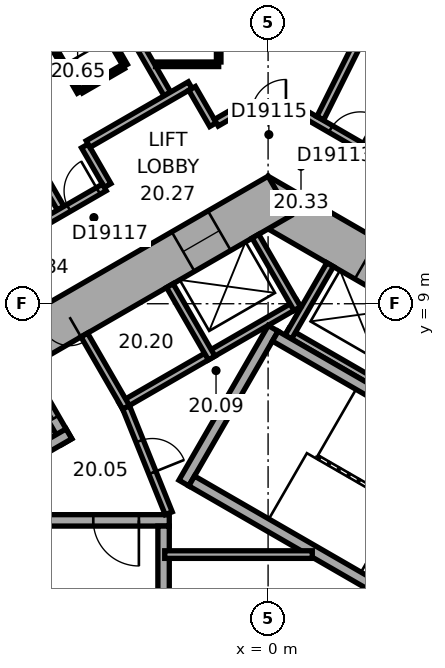
"""IFC4 building model, lengths in metres.
Left out: names, types, materials, properties, quantities, classifications, styles, units other than length and angle.
Written with IfcOpenShell. Run it as: python <this file> out.ifc"""

import sys

from ifc_helpers import new_model, si_unit, direction, frame, frame_2d, origin, place, context, subcontext, project, spatial, rectangle, extrude, element, fill, save


model = new_model("IFC4")
c1 = context("Model", 3, precision=1e-05, world=origin(), true_north=direction((0.0, 1.0)))
c2 = subcontext(c1, "Body", "Model", "MODEL_VIEW")
j1 = project(units=[si_unit("LENGTHUNIT", "METRE"), si_unit("PLANEANGLEUNIT", "RADIAN")], contexts=[c1])
p1 = place(None, origin())
s1 = spatial("IfcSite", under=j1, at=p1, CompositionType="ELEMENT")
p2 = place(p1, origin())
s2 = spatial("IfcBuilding", under=s1, at=p2, CompositionType="ELEMENT")
p3 = place(p2, frame((0.0, 0.0, 90.2)))
s3 = spatial("IfcBuildingStorey", under=s2, at=p3, CompositionType="ELEMENT", Elevation=90.2)
p4 = place(p3, frame((10.4, 5.658, 0.0), z_axis=(0.0, 0.0, 1.0), x_axis=(-0.866021384402, 0.500006961711, 0.0)))
e1 = element("IfcWall", 1, at=p4, inside=s3, PredefinedType="SHEAR", context=c2, shape_type="SweptSolid", body=[
    extrude(rectangle(XDim=12.355, YDim=1.2, at=frame_2d((6.178, 0.0))), origin(), (0.0, 0.0, 1.0), 3.3),
])
p5 = place(p4, frame((2.728, 0.0, 0.0)))
e2 = element("IfcOpeningElement", 2, at=p5, cuts=e1, PredefinedType="OPENING", context=c2, shape_type="SweptSolid", body=[
    extrude(rectangle(XDim=1.1, YDim=2.1, at=frame_2d((0.55, 1.05))), frame((0.0, 0.61, 0.0), z_axis=(0.0, -1.0, 0.0), x_axis=(1.0, 0.0, 0.0)), (0.0, 0.0, 1.0), 1.22),
])
p6 = place(p4, frame((5.328, 0.0, 0.0)))
e3 = element("IfcOpeningElement", 3, at=p6, cuts=e1, PredefinedType="OPENING", context=c2, shape_type="SweptSolid", body=[
    extrude(rectangle(XDim=1.1, YDim=2.1, at=frame_2d((0.55, 1.05))), frame((0.0, 0.61, 0.0), z_axis=(0.0, -1.0, 0.0), x_axis=(1.0, 0.0, 0.0)), (0.0, 0.0, 1.0), 1.22),
])
p7 = place(p4, frame((7.928, 0.0, 0.0)))
e4 = element("IfcOpeningElement", 4, at=p7, cuts=e1, PredefinedType="OPENING", context=c2, shape_type="SweptSolid", body=[
    extrude(rectangle(XDim=1.1, YDim=2.1, at=frame_2d((0.55, 1.05))), frame((0.0, 0.61, 0.0), z_axis=(0.0, -1.0, 0.0), x_axis=(1.0, 0.0, 0.0)), (0.0, 0.0, 1.0), 1.22),
])
p8 = place(p3, frame((0.3, 11.836, 0.0), z_axis=(0.0, 0.0, 1.0), x_axis=(-0.866021384402, -0.500006961711, 0.0)))
e5 = element("IfcWall", 5, at=p8, inside=s3, PredefinedType="SHEAR", context=c2, shape_type="SweptSolid", body=[
    extrude(rectangle(XDim=12.355, YDim=1.2, at=frame_2d((6.178, 0.0))), origin(), (0.0, 0.0, 1.0), 3.3),
])
p9 = place(p8, frame((6.378, 0.0, 0.0)))
e6 = element("IfcOpeningElement", 6, at=p9, cuts=e5, PredefinedType="OPENING", context=c2, shape_type="SweptSolid", body=[
    extrude(rectangle(XDim=1.5, YDim=2.1, at=frame_2d((0.75, 1.05))), frame((0.0, 0.61, 0.0), z_axis=(0.0, -1.0, 0.0), x_axis=(1.0, 0.0, 0.0)), (0.0, 0.0, 1.0), 1.22),
])
p10 = place(p8, frame((1.828, 0.0, 0.0)))
e7 = element("IfcOpeningElement", 7, at=p10, cuts=e5, PredefinedType="OPENING", context=c2, shape_type="SweptSolid", body=[
    extrude(rectangle(XDim=1.1, YDim=2.1, at=frame_2d((0.55, 1.05))), frame((0.0, 0.61, 0.0), z_axis=(0.0, -1.0, 0.0), x_axis=(1.0, 0.0, 0.0)), (0.0, 0.0, 1.0), 1.22),
])
p11 = place(p3, frame((20.63, 15.47, 0.0), z_axis=(0.0, 0.0, 1.0), x_axis=(-0.894934518609, 0.446197498203, 0.0)))
e8 = element("IfcWall", 8, at=p11, inside=s3, PredefinedType="STANDARD", context=c2, shape_type="SweptSolid", body=[
    extrude(rectangle(XDim=21.246, YDim=0.2, at=frame_2d((10.623, 0.0))), origin(), (0.0, 0.0, 1.0), 3.3),
])
p12 = place(p11, frame((1.553, 0.0, 0.8)))
e9 = element("IfcOpeningElement", 9, at=p12, cuts=e8, PredefinedType="OPENING", context=c2, shape_type="SweptSolid", body=[
    extrude(rectangle(XDim=2.4, YDim=1.7, at=frame_2d((1.2, 0.85))), frame((0.0, 0.11, 0.0), z_axis=(0.0, -1.0, 0.0), x_axis=(1.0, 0.0, 0.0)), (0.0, 0.0, 1.0), 0.22),
])
p13 = place(p11, frame((5.488, 0.0, 0.8)))
e10 = element("IfcOpeningElement", 10, at=p13, cuts=e8, PredefinedType="OPENING", context=c2, shape_type="SweptSolid", body=[
    extrude(rectangle(XDim=2.4, YDim=1.7, at=frame_2d((1.2, 0.85))), frame((0.0, 0.11, 0.0), z_axis=(0.0, -1.0, 0.0), x_axis=(1.0, 0.0, 0.0)), (0.0, 0.0, 1.0), 0.22),
])
p14 = place(p11, frame((9.422, 0.0, 0.8)))
e11 = element("IfcOpeningElement", 11, at=p14, cuts=e8, PredefinedType="OPENING", context=c2, shape_type="SweptSolid", body=[
    extrude(rectangle(XDim=2.4, YDim=1.7, at=frame_2d((1.2, 0.85))), frame((0.0, 0.11, 0.0), z_axis=(0.0, -1.0, 0.0), x_axis=(1.0, 0.0, 0.0)), (0.0, 0.0, 1.0), 0.22),
])
p15 = place(p11, frame((13.357, 0.0, 0.8)))
e12 = element("IfcOpeningElement", 12, at=p15, cuts=e8, PredefinedType="OPENING", context=c2, shape_type="SweptSolid", body=[
    extrude(rectangle(XDim=2.4, YDim=1.7, at=frame_2d((1.2, 0.85))), frame((0.0, 0.11, 0.0), z_axis=(0.0, -1.0, 0.0), x_axis=(1.0, 0.0, 0.0)), (0.0, 0.0, 1.0), 0.22),
])
p16 = place(p11, frame((17.292, 0.0, 0.8)))
e13 = element("IfcOpeningElement", 13, at=p16, cuts=e8, PredefinedType="OPENING", context=c2, shape_type="SweptSolid", body=[
    extrude(rectangle(XDim=2.4, YDim=1.7, at=frame_2d((1.2, 0.85))), frame((0.0, 0.11, 0.0), z_axis=(0.0, -1.0, 0.0), x_axis=(1.0, 0.0, 0.0)), (0.0, 0.0, 1.0), 0.22),
])
p17 = place(p3, frame((-3.136, 24.805, 0.0), z_axis=(0.0, 0.0, 1.0), x_axis=(-0.866028291626, -0.499994998079, 0.0)))
e14 = element("IfcWall", 14, at=p17, inside=s3, PredefinedType="STANDARD", context=c2, shape_type="SweptSolid", body=[
    extrude(rectangle(XDim=21.246, YDim=0.2, at=frame_2d((10.623, 0.0))), origin(), (0.0, 0.0, 1.0), 3.3),
])
p18 = place(p17, frame((1.555, 0.0, 0.8)))
e15 = element("IfcOpeningElement", 15, at=p18, cuts=e14, PredefinedType="OPENING", context=c2, shape_type="SweptSolid", body=[
    extrude(rectangle(XDim=2.4, YDim=1.7, at=frame_2d((1.2, 0.85))), frame((0.0, 0.11, 0.0), z_axis=(0.0, -1.0, 0.0), x_axis=(1.0, 0.0, 0.0)), (0.0, 0.0, 1.0), 0.22),
])
p19 = place(p17, frame((5.489, 0.0, 0.8)))
e16 = element("IfcOpeningElement", 16, at=p19, cuts=e14, PredefinedType="OPENING", context=c2, shape_type="SweptSolid", body=[
    extrude(rectangle(XDim=2.4, YDim=1.7, at=frame_2d((1.2, 0.85))), frame((0.0, 0.11, 0.0), z_axis=(0.0, -1.0, 0.0), x_axis=(1.0, 0.0, 0.0)), (0.0, 0.0, 1.0), 0.22),
])
p20 = place(p17, frame((9.424, 0.0, 0.8)))
e17 = element("IfcOpeningElement", 17, at=p20, cuts=e14, PredefinedType="OPENING", context=c2, shape_type="SweptSolid", body=[
    extrude(rectangle(XDim=2.4, YDim=1.7, at=frame_2d((1.2, 0.85))), frame((0.0, 0.11, 0.0), z_axis=(0.0, -1.0, 0.0), x_axis=(1.0, 0.0, 0.0)), (0.0, 0.0, 1.0), 0.22),
])
p21 = place(p17, frame((13.358, 0.0, 0.8)))
e18 = element("IfcOpeningElement", 18, at=p21, cuts=e14, PredefinedType="OPENING", context=c2, shape_type="SweptSolid", body=[
    extrude(rectangle(XDim=2.4, YDim=1.7, at=frame_2d((1.2, 0.85))), frame((0.0, 0.11, 0.0), z_axis=(0.0, -1.0, 0.0), x_axis=(1.0, 0.0, 0.0)), (0.0, 0.0, 1.0), 0.22),
])
p22 = place(p17, frame((17.293, 0.0, 0.8)))
e19 = element("IfcOpeningElement", 19, at=p22, cuts=e14, PredefinedType="OPENING", context=c2, shape_type="SweptSolid", body=[
    extrude(rectangle(XDim=2.4, YDim=1.7, at=frame_2d((1.2, 0.85))), frame((0.0, 0.11, 0.0), z_axis=(0.0, -1.0, 0.0), x_axis=(1.0, 0.0, 0.0)), (0.0, 0.0, 1.0), 0.22),
])
p23 = place(p3, frame((7.424, 4.259, 0.0), z_axis=(0.0, 0.0, 1.0), x_axis=(-0.866026010844, 0.49999894854, 0.0)))
e20 = element("IfcWall", 20, at=p23, inside=s3, PredefinedType="PARTITIONING", context=c2, shape_type="SweptSolid", body=[
    extrude(rectangle(XDim=8.0, YDim=0.2, at=frame_2d((4.0, 0.0))), origin(), (0.0, 0.0, 1.0), 3.05),
])
p24 = place(p3, frame((0.532, 8.122, 0.0), z_axis=(0.0, 0.0, 1.0), x_axis=(0.500077893725, 0.86598042715, 0.0)))
e21 = element("IfcWall", 21, at=p24, inside=s3, PredefinedType="PARTITIONING", context=c2, shape_type="SweptSolid", body=[
    extrude(rectangle(XDim=2.2, YDim=0.2, at=frame_2d((1.1, 0.0))), origin(), (0.0, 0.0, 1.0), 3.05),
])
p25 = place(p3, frame((0.803, 9.009, 0.0), z_axis=(0.0, 0.0, 1.0), x_axis=(-0.866028230842, -0.499995103361, 0.0)))
e22 = element("IfcWall", 22, at=p25, inside=s3, PredefinedType="PARTITIONING", context=c2, shape_type="SweptSolid", body=[
    extrude(rectangle(XDim=5.4, YDim=0.2, at=frame_2d((2.7, 0.0))), origin(), (0.0, 0.0, 1.0), 3.05),
])
p26 = place(p3, frame((0.767, 8.872, 0.0), z_axis=(0.0, 0.0, 1.0), x_axis=(-0.499994660107, 0.866028486751, 0.0)))
e23 = element("IfcWall", 23, at=p26, inside=s3, PredefinedType="PARTITIONING", context=c2, shape_type="SweptSolid", body=[
    extrude(rectangle(XDim=2.2, YDim=0.2, at=frame_2d((1.1, 0.0))), origin(), (0.0, 0.0, 1.0), 3.05),
])
for number, where, z_axis, x_axis in (
    (24, (-1.485, 7.572, 0.0), (0.0, 0.0, 1.0), (-0.5, 0.866, 0.0)),
    (25, (-3.737, 6.272, 0.0), (0.0, 0.0, 1.0), (-0.5, 0.866, 0.0)),
):
    element("IfcWall", number, at=place(p3, frame(where, z_axis=z_axis, x_axis=x_axis)), inside=s3, PredefinedType="PARTITIONING", context=c2, shape_type="SweptSolid", body=[
        extrude(rectangle(XDim=2.2, YDim=0.2, at=frame_2d((1.1, 0.0))), origin(), (0.0, 0.0, 1.0), 3.05),
    ])
p27 = place(p3, frame((-2.216, 4.282, 0.0), z_axis=(0.0, 0.0, 1.0), x_axis=(0.499977259774, 0.866038532462, 0.0)))
e26 = element("IfcWall", 26, at=p27, inside=s3, PredefinedType="SHEAR", context=c2, shape_type="SweptSolid", body=[
    extrude(rectangle(XDim=4.7, YDim=0.3, at=frame_2d((2.35, 0.0))), origin(), (0.0, 0.0, 1.0), 3.05),
])
for number, where, z_axis, x_axis in (
    (27, (4.103, 0.807, 0.0), (0.0, 0.0, 1.0), (-0.866, 0.5, 0.0)),
    (28, (6.303, 4.617, 0.0), (0.0, 0.0, 1.0), (-0.866, 0.5, 0.0)),
):
    element("IfcWall", number, at=place(p3, frame(where, z_axis=z_axis, x_axis=x_axis)), inside=s3, PredefinedType="SHEAR", context=c2, shape_type="SweptSolid", body=[
        extrude(rectangle(XDim=7.06, YDim=0.3, at=frame_2d((3.53, 0.0))), origin(), (0.0, 0.0, 1.0), 3.05),
    ])
p28 = place(p3, frame((-2.6, 3.3, 0.0), z_axis=(0.0, 0.0, 1.0), x_axis=(-1.0, 0.0, 0.0)))
e29 = element("IfcWall", 29, at=p28, inside=s3, PredefinedType="SHEAR", context=c2, shape_type="SweptSolid", body=[
    extrude(rectangle(XDim=4.7, YDim=0.3, at=frame_2d((2.35, 0.0))), origin(), (0.0, 0.0, 1.0), 3.05),
])
p29 = place(p28, frame((0.8, 0.0, 0.0)))
e30 = element("IfcOpeningElement", 30, at=p29, cuts=e29, PredefinedType="OPENING", context=c2, shape_type="SweptSolid", body=[
    extrude(rectangle(XDim=1.2, YDim=2.1, at=frame_2d((0.6, 1.05))), frame((0.0, 0.16, 0.0), z_axis=(0.0, -1.0, 0.0), x_axis=(1.0, 0.0, 0.0)), (0.0, 0.0, 1.0), 0.32),
])
p30 = place(p3, frame((-2.75, 3.15, 0.0), z_axis=(0.0, 0.0, 1.0), x_axis=(0.0, -1.0, 0.0)))
e31 = element("IfcWall", 31, at=p30, inside=s3, PredefinedType="SHEAR", context=c2, shape_type="SweptSolid", body=[
    extrude(rectangle(XDim=7.06, YDim=0.3, at=frame_2d((3.53, 0.0))), origin(), (0.0, 0.0, 1.0), 3.05),
])
p31 = place(p3, frame((-5.295, 5.372, 0.0), z_axis=(0.0, 0.0, 1.0), x_axis=(-0.500077893725, 0.86598042715, 0.0)))
e32 = element("IfcWall", 32, at=p31, inside=s3, PredefinedType="SHEAR", context=c2, shape_type="SweptSolid", body=[
    extrude(rectangle(XDim=2.2, YDim=0.3, at=frame_2d((1.1, 0.0))), origin(), (0.0, 0.0, 1.0), 3.05),
])
p32 = place(p31, frame((0.7, 0.0, 0.0)))
e33 = element("IfcOpeningElement", 33, at=p32, cuts=e32, PredefinedType="OPENING", context=c2, shape_type="SweptSolid", body=[
    extrude(rectangle(XDim=1.1, YDim=2.1, at=frame_2d((0.55, 1.05))), frame((0.0, 0.16, 0.0), z_axis=(0.0, -1.0, 0.0), x_axis=(1.0, 0.0, 0.0)), (0.0, 0.0, 1.0), 0.32),
])
p33 = place(p3, frame((-5.24, 5.577, 0.0), z_axis=(0.0, 0.0, 1.0), x_axis=(-0.866014461049, -0.500018952895, 0.0)))
e34 = element("IfcWall", 34, at=p33, inside=s3, PredefinedType="SHEAR", context=c2, shape_type="SweptSolid", body=[
    extrude(rectangle(XDim=3.35, YDim=0.3, at=frame_2d((1.675, 0.0))), origin(), (0.0, 0.0, 1.0), 3.05),
])
p34 = place(p3, frame((-2.615, 3.487, 0.0), z_axis=(0.0, 0.0, 1.0), x_axis=(-0.373576831041, 0.92759924068, 0.0)))
e35 = element("IfcWall", 35, at=p34, inside=s3, PredefinedType="PARTITIONING", context=c2, shape_type="SweptSolid", body=[
    extrude(rectangle(XDim=3.002, YDim=0.2, at=frame_2d((1.501, 0.0))), origin(), (0.0, 0.0, 1.0), 3.05),
])
p35 = place(p34, frame((1.15, 0.0, 0.0)))
e36 = element("IfcOpeningElement", 36, at=p35, cuts=e35, PredefinedType="OPENING", context=c2, shape_type="SweptSolid", body=[
    extrude(rectangle(XDim=0.9, YDim=2.1, at=frame_2d((0.45, 1.05))), frame((0.0, 0.11, 0.0), z_axis=(0.0, -1.0, 0.0), x_axis=(1.0, 0.0, 0.0)), (0.0, 0.0, 1.0), 0.22),
])
p36 = place(p3, frame((-2.72, 2.4, 0.0), z_axis=(0.0, 0.0, 1.0), x_axis=(1.0, 0.0, 0.0)))
e37 = element("IfcWall", 37, at=p36, inside=s3, PredefinedType="PARTITIONING", context=c2, shape_type="SweptSolid", body=[
    extrude(rectangle(XDim=3.883, YDim=0.2, at=frame_2d((1.941, 0.0))), origin(), (0.0, 0.0, 1.0), 3.05),
])
p37 = place(p3, frame((-10.083, 19.524, 0.0), z_axis=(0.0, 0.0, 1.0), x_axis=(0.499999662836, -0.866025598446, 0.0)))
e38 = element("IfcWall", 38, at=p37, inside=s3, PredefinedType="PARTITIONING", context=c2, shape_type="SweptSolid", body=[
    extrude(rectangle(XDim=9.25, YDim=0.2, at=frame_2d((4.625, 0.0))), origin(), (0.0, 0.0, 1.0), 2.6),
])
p38 = place(p3, frame((-6.676, 21.492, 0.0), z_axis=(0.0, 0.0, 1.0), x_axis=(0.500011263043, -0.866018900966, 0.0)))
e39 = element("IfcWall", 39, at=p38, inside=s3, PredefinedType="PARTITIONING", context=c2, shape_type="SweptSolid", body=[
    extrude(rectangle(XDim=8.049, YDim=0.2, at=frame_2d((4.024, 0.0))), origin(), (0.0, 0.0, 1.0), 3.05),
])
p39 = place(p3, frame((-5.026, 17.469, 0.0), z_axis=(0.0, 0.0, 1.0), x_axis=(0.500005339912, -0.866022320763, 0.0)))
e40 = element("IfcWall", 40, at=p39, inside=s3, PredefinedType="PARTITIONING", context=c2, shape_type="SweptSolid", body=[
    extrude(rectangle(XDim=2.54, YDim=0.12, at=frame_2d((1.27, 0.0))), origin(), (0.0, 0.0, 1.0), 3.05),
])
p40 = place(p3, frame((-4.968, 14.569, 0.0), z_axis=(0.0, 0.0, 1.0), x_axis=(-0.500046963369, 0.865998287773, 0.0)))
e41 = element("IfcWall", 41, at=p40, inside=s3, PredefinedType="PARTITIONING", context=c2, shape_type="SweptSolid", body=[
    extrude(rectangle(XDim=2.54, YDim=0.12, at=frame_2d((1.27, 0.0))), origin(), (0.0, 0.0, 1.0), 3.05),
])
p41 = place(p40, frame((0.82, 0.0, 0.0)))
e42 = element("IfcOpeningElement", 42, at=p41, cuts=e41, PredefinedType="OPENING", context=c2, shape_type="SweptSolid", body=[
    extrude(rectangle(XDim=0.9, YDim=2.1, at=frame_2d((0.45, 1.05))), frame((0.0, 0.07, 0.0), z_axis=(0.0, -1.0, 0.0), x_axis=(1.0, 0.0, 0.0)), (0.0, 0.0, 1.0), 0.14),
])
p42 = place(p3, frame((-4.823, 13.152, 0.0), z_axis=(0.0, 0.0, 1.0), x_axis=(0.499986357472, -0.866033280158, 0.0)))
e43 = element("IfcWall", 43, at=p42, inside=s3, PredefinedType="PARTITIONING", context=c2, shape_type="SweptSolid", body=[
    extrude(rectangle(XDim=1.201, YDim=0.2, at=frame_2d((0.601, 0.0))), origin(), (0.0, 0.0, 1.0), 3.05),
])
p43 = place(p3, frame((-4.309, 12.061, 0.0), z_axis=(0.0, 0.0, 1.0), x_axis=(-0.866020679205, -0.500008183122, 0.0)))
e44 = element("IfcWall", 44, at=p43, inside=s3, PredefinedType="PARTITIONING", context=c2, shape_type="SweptSolid", body=[
    extrude(rectangle(XDim=5.104, YDim=0.2, at=frame_2d((2.552, 0.0))), origin(), (0.0, 0.0, 1.0), 3.05),
])
p44 = place(p43, frame((0.185, 0.0, 0.0)))
e45 = element("IfcOpeningElement", 45, at=p44, cuts=e44, PredefinedType="OPENING", context=c2, shape_type="SweptSolid", body=[
    extrude(rectangle(XDim=0.9, YDim=2.1, at=frame_2d((0.45, 1.05))), frame((0.0, 0.11, 0.0), z_axis=(0.0, -1.0, 0.0), x_axis=(1.0, 0.0, 0.0)), (0.0, 0.0, 1.0), 0.22),
])
p45 = place(p43, frame((3.761, 0.0, 0.0)))
e46 = element("IfcOpeningElement", 46, at=p45, cuts=e44, PredefinedType="OPENING", context=c2, shape_type="SweptSolid", body=[
    extrude(rectangle(XDim=0.9, YDim=2.1, at=frame_2d((0.45, 1.05))), frame((0.0, 0.11, 0.0), z_axis=(0.0, -1.0, 0.0), x_axis=(1.0, 0.0, 0.0)), (0.0, 0.0, 1.0), 0.22),
])
p46 = place(p3, frame((-3.808, 15.239, 0.0), z_axis=(0.0, 0.0, 1.0), x_axis=(-0.866087136806, -0.499893060024, 0.0)))
e47 = element("IfcWall", 47, at=p46, inside=s3, PredefinedType="PARTITIONING", context=c2, shape_type="SweptSolid", body=[
    extrude(rectangle(XDim=1.28, YDim=0.12, at=frame_2d((0.64, 0.0))), origin(), (0.0, 0.0, 1.0), 3.05),
])
p47 = place(p3, frame((-2.05, 14.752, 0.0), z_axis=(0.0, 0.0, 1.0), x_axis=(-0.866030936828, -0.499990416364, 0.0)))
e48 = element("IfcWall", 48, at=p47, inside=s3, PredefinedType="PARTITIONING", context=c2, shape_type="SweptSolid", body=[
    extrude(rectangle(XDim=3.102, YDim=0.2, at=frame_2d((1.551, 0.0))), origin(), (0.0, 0.0, 1.0), 3.05),
])
p48 = place(p3, frame((-1.449, 13.712, 0.0), z_axis=(0.0, 0.0, 1.0), x_axis=(-0.499978356969, 0.866037899034, 0.0)))
e49 = element("IfcWall", 49, at=p48, inside=s3, PredefinedType="PARTITIONING", context=c2, shape_type="SweptSolid", body=[
    extrude(rectangle(XDim=1.101, YDim=0.2, at=frame_2d((0.551, 0.0))), origin(), (0.0, 0.0, 1.0), 3.05),
])
p49 = place(p3, frame((-1.3, 15.301, 0.0), z_axis=(0.0, 0.0, 1.0), x_axis=(-1.0, 0.0, 0.0)))
e50 = element("IfcWall", 50, at=p49, inside=s3, PredefinedType="PARTITIONING", context=c2, shape_type="SweptSolid", body=[
    extrude(rectangle(XDim=1.661, YDim=0.12, at=frame_2d((0.831, 0.0))), origin(), (0.0, 0.0, 1.0), 3.05),
])
p50 = place(p3, frame((-1.3, 18.041, 0.0), z_axis=(0.0, 0.0, 1.0), x_axis=(0.0, -1.0, 0.0)))
e51 = element("IfcWall", 51, at=p50, inside=s3, PredefinedType="PARTITIONING", context=c2, shape_type="SweptSolid", body=[
    extrude(rectangle(XDim=2.68, YDim=0.12, at=frame_2d((1.34, 0.0))), origin(), (0.0, 0.0, 1.0), 3.05),
])
p51 = place(p50, frame((0.89, 0.0, 0.0)))
e52 = element("IfcOpeningElement", 52, at=p51, cuts=e51, PredefinedType="OPENING", context=c2, shape_type="SweptSolid", body=[
    extrude(rectangle(XDim=0.9, YDim=2.1, at=frame_2d((0.45, 1.05))), frame((0.0, 0.07, 0.0), z_axis=(0.0, -1.0, 0.0), x_axis=(1.0, 0.0, 0.0)), (0.0, 0.0, 1.0), 0.14),
])
p52 = place(p3, frame((-0.95, 14.001, 0.0), z_axis=(0.0, 0.0, 1.0), x_axis=(-0.86609177584, -0.499885022602, 0.0)))
e53 = element("IfcWall", 53, at=p52, inside=s3, PredefinedType="PARTITIONING", context=c2, shape_type="SweptSolid", body=[
    extrude(rectangle(XDim=0.477, YDim=0.2, at=frame_2d((0.238, 0.0))), origin(), (0.0, 0.0, 1.0), 3.05),
])
p53 = place(p3, frame((0.95, 14.001, 0.0), z_axis=(0.0, 0.0, 1.0), x_axis=(-1.0, 0.0, 0.0)))
e54 = element("IfcWall", 54, at=p53, inside=s3, PredefinedType="PARTITIONING", context=c2, shape_type="SweptSolid", body=[
    extrude(rectangle(XDim=1.86, YDim=0.2, at=frame_2d((0.93, 0.0))), origin(), (0.0, 0.0, 1.0), 3.05),
])
p54 = place(p53, frame((0.48, 0.0, 0.0)))
e55 = element("IfcOpeningElement", 55, at=p54, cuts=e54, PredefinedType="OPENING", context=c2, shape_type="SweptSolid", body=[
    extrude(rectangle(XDim=0.9, YDim=2.1, at=frame_2d((0.45, 1.05))), frame((0.0, 0.11, 0.0), z_axis=(0.0, -1.0, 0.0), x_axis=(1.0, 0.0, 0.0)), (0.0, 0.0, 1.0), 0.22),
])
p55 = place(p3, frame((2.748, 12.962, 0.0), z_axis=(0.0, 0.0, 1.0), x_axis=(-0.866013897511, 0.50001992892, 0.0)))
e56 = element("IfcWall", 56, at=p55, inside=s3, PredefinedType="PARTITIONING", context=c2, shape_type="SweptSolid", body=[
    extrude(rectangle(XDim=2.037, YDim=0.2, at=frame_2d((1.018, 0.0))), origin(), (0.0, 0.0, 1.0), 3.05),
])
p56 = place(p55, frame((0.372, 0.0, 0.0)))
e57 = element("IfcOpeningElement", 57, at=p56, cuts=e56, PredefinedType="OPENING", context=c2, shape_type="SweptSolid", body=[
    extrude(rectangle(XDim=0.9, YDim=2.1, at=frame_2d((0.45, 1.05))), frame((0.0, 0.11, 0.0), z_axis=(0.0, -1.0, 0.0), x_axis=(1.0, 0.0, 0.0)), (0.0, 0.0, 1.0), 0.22),
])
p57 = place(p3, frame((5.351, 21.859, 0.0), z_axis=(0.0, 0.0, 1.0), x_axis=(-0.446205309328, -0.894930624086, 0.0)))
e58 = element("IfcWall", 58, at=p57, inside=s3, PredefinedType="PARTITIONING", context=c2, shape_type="SweptSolid", body=[
    extrude(rectangle(XDim=8.913, YDim=0.2, at=frame_2d((4.457, 0.0))), origin(), (0.0, 0.0, 1.0), 2.6),
])
p58 = place(p9, origin())
e59 = element("IfcDoor", 59, at=p58, inside=s3, OperationType="DOUBLE_DOOR_SINGLE_SWING", PredefinedType="DOOR", context=c2, shape_type="SweptSolid", body=[
    extrude(rectangle(XDim=1.5, YDim=2.1, at=frame_2d((0.75, 1.05))), frame((0.0, 0.025, 0.0), z_axis=(0.0, -1.0, 0.0), x_axis=(1.0, 0.0, 0.0)), (0.0, 0.0, 1.0), 0.05),
])
fill(e6, e59)
p59 = place(p29, origin())
e60 = element("IfcDoor", 60, at=p59, inside=s3, OperationType="SINGLE_SWING_RIGHT", PredefinedType="DOOR", context=c2, shape_type="SweptSolid", body=[
    extrude(rectangle(XDim=1.2, YDim=2.1, at=frame_2d((0.6, 1.05))), frame((0.0, 0.025, 0.0), z_axis=(0.0, -1.0, 0.0), x_axis=(1.0, 0.0, 0.0)), (0.0, 0.0, 1.0), 0.05),
])
fill(e30, e60)
p60 = place(p35, origin())
e61 = element("IfcDoor", 61, at=p60, inside=s3, OperationType="SINGLE_SWING_LEFT", PredefinedType="DOOR", context=c2, shape_type="SweptSolid", body=[
    extrude(rectangle(XDim=0.9, YDim=2.1, at=frame_2d((0.45, 1.05))), frame((0.0, 0.025, 0.0), z_axis=(0.0, -1.0, 0.0), x_axis=(1.0, 0.0, 0.0)), (0.0, 0.0, 1.0), 0.05),
])
fill(e36, e61)
p61 = place(p32, origin())
e62 = element("IfcDoor", 62, at=p61, inside=s3, OperationType="DOUBLE_DOOR_SLIDING", PredefinedType="DOOR", context=c2, shape_type="SweptSolid", body=[
    extrude(rectangle(XDim=1.1, YDim=2.1, at=frame_2d((0.55, 1.05))), frame((0.0, 0.025, 0.0), z_axis=(0.0, -1.0, 0.0), x_axis=(1.0, 0.0, 0.0)), (0.0, 0.0, 1.0), 0.05),
])
fill(e33, e62)
p62 = place(p10, origin())
e63 = element("IfcDoor", 63, at=p62, inside=s3, OperationType="DOUBLE_DOOR_SLIDING", PredefinedType="DOOR", context=c2, shape_type="SweptSolid", body=[
    extrude(rectangle(XDim=1.1, YDim=2.1, at=frame_2d((0.55, 1.05))), frame((0.0, 0.025, 0.0), z_axis=(0.0, -1.0, 0.0), x_axis=(1.0, 0.0, 0.0)), (0.0, 0.0, 1.0), 0.05),
])
fill(e7, e63)
p63 = place(p56, origin())
e64 = element("IfcDoor", 64, at=p63, inside=s3, OperationType="SINGLE_SWING_LEFT", PredefinedType="DOOR", context=c2, shape_type="SweptSolid", body=[
    extrude(rectangle(XDim=0.9, YDim=2.1, at=frame_2d((0.45, 1.05))), frame((0.0, 0.025, 0.0), z_axis=(0.0, -1.0, 0.0), x_axis=(1.0, 0.0, 0.0)), (0.0, 0.0, 1.0), 0.05),
])
fill(e57, e64)
p64 = place(p54, origin())
e65 = element("IfcDoor", 65, at=p64, inside=s3, OperationType="SINGLE_SWING_LEFT", PredefinedType="DOOR", context=c2, shape_type="SweptSolid", body=[
    extrude(rectangle(XDim=0.9, YDim=2.1, at=frame_2d((0.45, 1.05))), frame((0.0, 0.025, 0.0), z_axis=(0.0, -1.0, 0.0), x_axis=(1.0, 0.0, 0.0)), (0.0, 0.0, 1.0), 0.05),
])
fill(e55, e65)
p65 = place(p44, origin())
e66 = element("IfcDoor", 66, at=p65, inside=s3, OperationType="SINGLE_SWING_LEFT", PredefinedType="DOOR", context=c2, shape_type="SweptSolid", body=[
    extrude(rectangle(XDim=0.9, YDim=2.1, at=frame_2d((0.45, 1.05))), frame((0.0, 0.025, 0.0), z_axis=(0.0, -1.0, 0.0), x_axis=(1.0, 0.0, 0.0)), (0.0, 0.0, 1.0), 0.05),
])
fill(e45, e66)
p66 = place(p41, origin())
e67 = element("IfcDoor", 67, at=p66, inside=s3, OperationType="SINGLE_SWING_LEFT", PredefinedType="DOOR", context=c2, shape_type="SweptSolid", body=[
    extrude(rectangle(XDim=0.9, YDim=2.1, at=frame_2d((0.45, 1.05))), frame((0.0, 0.025, 0.0), z_axis=(0.0, -1.0, 0.0), x_axis=(1.0, 0.0, 0.0)), (0.0, 0.0, 1.0), 0.05),
])
fill(e42, e67)
save(model, sys.argv[1])
